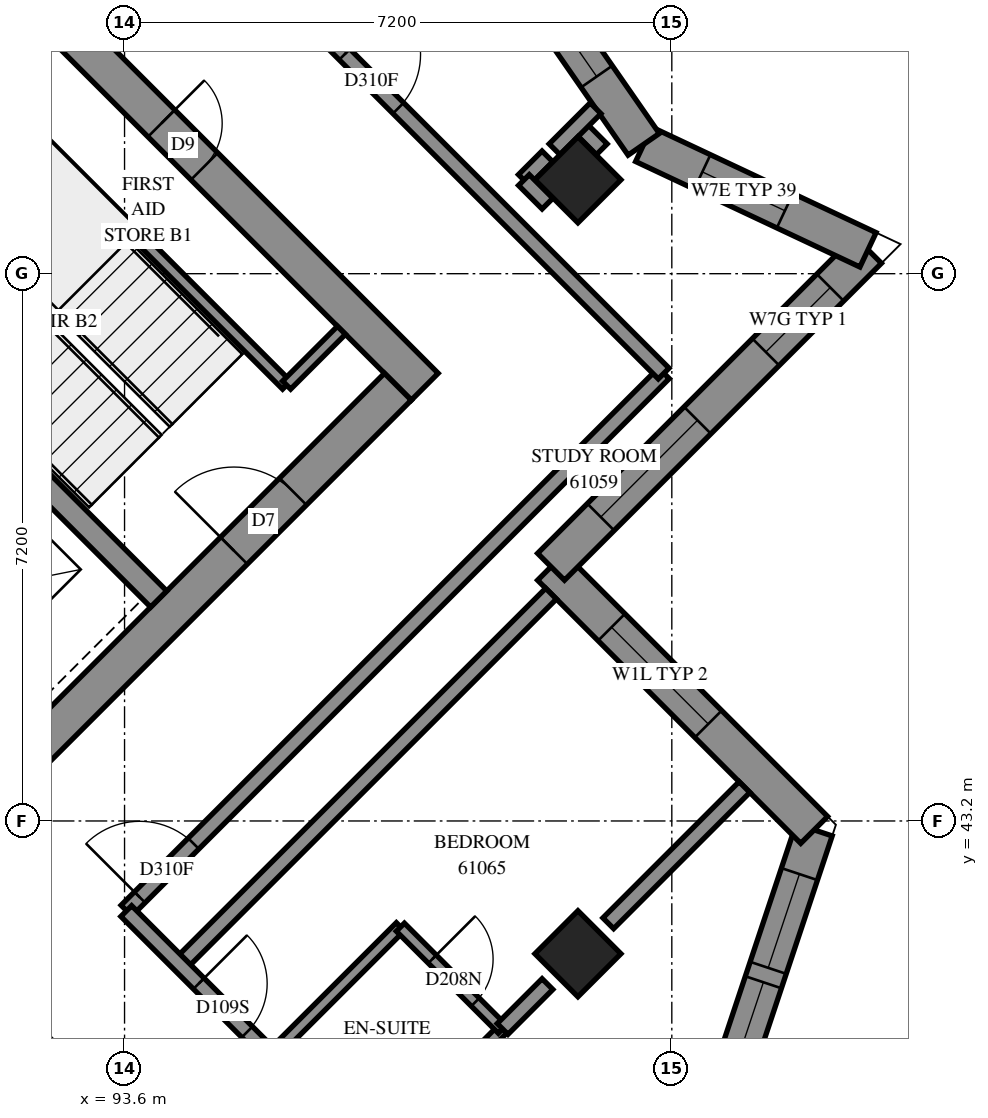
"""IFC4 building model, lengths in metres.
Left out: names, types, materials, properties, quantities, classifications, styles, units other than length and angle.
Written with IfcOpenShell. Run it as: python <this file> out.ifc"""

import sys

from ifc_helpers import new_model, si_unit, direction, frame, frame_2d, origin, origin_2d, place, context, subcontext, project, spatial, polyline, rectangle, outline, extrude, element, fill, save


model = new_model("IFC4")
c1 = context("Model", 3, precision=1e-05, world=origin(), true_north=direction((0.0, 1.0)))
c2 = subcontext(c1, "Body", "Model", "MODEL_VIEW")
j1 = project(units=[si_unit("LENGTHUNIT", "METRE"), si_unit("PLANEANGLEUNIT", "RADIAN")], contexts=[c1])
p1 = place(None, origin())
s1 = spatial("IfcSite", under=j1, at=p1, CompositionType="ELEMENT")
p2 = place(p1, origin())
s2 = spatial("IfcBuilding", under=s1, at=p2, CompositionType="ELEMENT")
p3 = place(p2, frame((0.0, 0.0, 223.6)))
s3 = spatial("IfcBuildingStorey", under=s2, at=p3, CompositionType="ELEMENT", Elevation=223.6)
for number, where, z_axis, x_axis in (
    (1, (99.565, 51.635, 0.0), (0.0, 0.0, 1.0), (0.707, -0.707, 0.0)),
    (2, (99.565, 41.453, 0.0), (0.0, 0.0, 1.0), (0.707, -0.707, 0.0)),
):
    element("IfcColumn", number, at=place(p3, frame(where, z_axis=z_axis, x_axis=x_axis)), inside=s3, PredefinedType="COLUMN", context=c2, shape_type="SweptSolid", body=[
        extrude(rectangle(XDim=0.8, YDim=0.8, at=origin_2d()), origin(), (0.0, 0.0, 1.0), 3.1),
    ])
p4 = place(p3, frame((86.66, 59.802, -0.3), z_axis=(0.0, 0.0, 1.0), x_axis=(0.7071067812, -0.7071067812, 0.0)))
e3 = element("IfcWall", 3, at=p4, inside=s3, PredefinedType="SHEAR", context=c2, shape_type="SweptSolid", body=[
    extrude(rectangle(XDim=15.4, YDim=0.5, at=frame_2d((7.7, 0.0))), origin(), (0.0, 0.0, 1.0), 2.7),
])
p5 = place(p4, frame((10.5, 0.0, 0.3)))
e4 = element("IfcOpeningElement", 4, at=p5, cuts=e3, PredefinedType="OPENING", context=c2, shape_type="SweptSolid", body=[
    extrude(rectangle(XDim=0.8, YDim=2.1, at=frame_2d((0.4, 1.05))), frame((0.0, 0.26, 0.0), z_axis=(0.0, -1.0, 0.0), x_axis=(1.0, 0.0, 0.0)), (0.0, 0.0, 1.0), 0.52),
])
p6 = place(p3, frame((87.013, 38.731, -0.3), z_axis=(0.0, 0.0, 1.0), x_axis=(0.7071067812, 0.7071067812, 0.0)))
e5 = element("IfcWall", 5, at=p6, inside=s3, PredefinedType="SHEAR", context=c2, shape_type="SweptSolid", body=[
    extrude(rectangle(XDim=14.4, YDim=0.5, at=frame_2d((7.2, 0.0))), origin(), (0.0, 0.0, 1.0), 2.7),
])
p7 = place(p6, frame((4.55, 0.0, 0.3)))
e6 = element("IfcOpeningElement", 6, at=p7, cuts=e5, PredefinedType="OPENING", context=c2, shape_type="SweptSolid", body=[
    extrude(rectangle(XDim=1.1, YDim=2.1, at=frame_2d((0.55, 1.05))), frame((0.0, 0.26, 0.0), z_axis=(0.0, -1.0, 0.0), x_axis=(1.0, 0.0, 0.0)), (0.0, 0.0, 1.0), 0.52),
])
p8 = place(p6, frame((11.35, 0.0, 0.3)))
e7 = element("IfcOpeningElement", 7, at=p8, cuts=e5, PredefinedType="OPENING", context=c2, shape_type="SweptSolid", body=[
    extrude(rectangle(XDim=1.1, YDim=2.1, at=frame_2d((0.55, 1.05))), frame((0.0, 0.26, 0.0), z_axis=(0.0, -1.0, 0.0), x_axis=(1.0, 0.0, 0.0)), (0.0, 0.0, 1.0), 0.52),
])
p9 = place(p3, frame((88.958, 51.211, 0.0), z_axis=(0.0, 0.0, 1.0), x_axis=(0.7070998367, -0.7071137256, 0.0)))
e8 = element("IfcWall", 8, at=p9, inside=s3, PredefinedType="SOLIDWALL", context=c2, shape_type="SweptSolid", body=[
    extrude(rectangle(XDim=7.2, YDim=0.3, at=frame_2d((3.6, 0.0))), origin(), (0.0, 0.0, 1.0), 3.1),
])
p10 = place(p3, frame((101.062, 38.252, 0.0), z_axis=(0.0, 0.0, 1.0), x_axis=(0.3162395484, 0.9486793705, 0.0)))
e9 = element("IfcWall", 9, at=p10, inside=s3, PredefinedType="SOLIDWALL", context=c2, shape_type="SweptSolid", body=[
    extrude(outline(polyline([(-0.12, -0.25), (5.247, -0.25), (4.938, 0.25), (0.12, 0.25), (-0.12, -0.25)])), origin(), (0.0, 0.0, 1.0), 3.1),
])
p11 = place(p10, frame((1.68, 0.0, 0.45)))
e10 = element("IfcOpeningElement", 10, at=p11, cuts=e9, PredefinedType="OPENING", context=c2, shape_type="SweptSolid", body=[
    extrude(rectangle(XDim=1.3, YDim=2.5, at=frame_2d((0.65, 1.25))), frame((0.0, 0.26, 0.0), z_axis=(0.0, -1.0, 0.0), x_axis=(1.0, 0.0, 0.0)), (0.0, 0.0, 1.0), 0.52),
])
p12 = place(p10, frame((3.18, 0.0, 0.45)))
e11 = element("IfcOpeningElement", 11, at=p12, cuts=e9, PredefinedType="OPENING", context=c2, shape_type="SweptSolid", body=[
    extrude(rectangle(XDim=1.3, YDim=2.5, at=frame_2d((0.65, 1.25))), frame((0.0, 0.26, 0.0), z_axis=(0.0, -1.0, 0.0), x_axis=(1.0, 0.0, 0.0)), (0.0, 0.0, 1.0), 0.52),
])
p13 = place(p3, frame((102.673, 43.083, 0.0), z_axis=(0.0, 0.0, 1.0), x_axis=(-0.7071067812, 0.7071067812, 0.0)))
e12 = element("IfcWall", 12, at=p13, inside=s3, PredefinedType="SOLIDWALL", context=c2, shape_type="SweptSolid", body=[
    extrude(outline(polyline([(-0.154, -0.25), (4.646, -0.25), (5.146, 0.25), (0.154, 0.25), (-0.154, -0.25)])), origin(), (0.0, 0.0, 1.0), 3.1),
])
p14 = place(p13, frame((1.97, 0.0, 0.6)))
e13 = element("IfcOpeningElement", 13, at=p14, cuts=e12, PredefinedType="OPENING", context=c2, shape_type="SweptSolid", body=[
    extrude(rectangle(XDim=1.8, YDim=1.9, at=frame_2d((0.9, 0.95))), frame((0.0, 0.26, 0.0), z_axis=(0.0, -1.0, 0.0), x_axis=(1.0, 0.0, 0.0)), (0.0, 0.0, 1.0), 0.52),
])
p15 = place(p3, frame((99.211, 46.544, 0.0), z_axis=(0.0, 0.0, 1.0), x_axis=(0.7071152597, 0.7070983025, 0.0)))
e14 = element("IfcWall", 14, at=p15, inside=s3, PredefinedType="SOLIDWALL", context=c2, shape_type="SweptSolid", body=[
    extrude(outline(polyline([(0.25, -0.25), (6.253, -0.25), (5.541, 0.25), (-0.25, 0.25), (0.25, -0.25)])), origin(), (0.0, 0.0, 1.0), 3.1),
])
p16 = place(p15, frame((0.925, 0.0, 0.6)))
e15 = element("IfcOpeningElement", 15, at=p16, cuts=e14, PredefinedType="OPENING", context=c2, shape_type="SweptSolid", body=[
    extrude(rectangle(XDim=1.8, YDim=1.9, at=frame_2d((0.9, 0.95))), frame((0.0, 0.26, 0.0), z_axis=(0.0, -1.0, 0.0), x_axis=(1.0, 0.0, 0.0)), (0.0, 0.0, 1.0), 0.52),
])
p17 = place(p15, frame((3.996, 0.0, 0.6)))
e16 = element("IfcOpeningElement", 16, at=p17, cuts=e14, PredefinedType="OPENING", context=c2, shape_type="SweptSolid", body=[
    extrude(rectangle(XDim=1.2, YDim=1.9, at=frame_2d((0.6, 0.95))), frame((0.0, 0.26, 0.0), z_axis=(0.0, -1.0, 0.0), x_axis=(1.0, 0.0, 0.0)), (0.0, 0.0, 1.0), 0.52),
])
p18 = place(p3, frame((103.381, 50.714, 0.0), z_axis=(0.0, 0.0, 1.0), x_axis=(-0.9049027781, 0.4256183292, 0.0)))
e17 = element("IfcWall", 17, at=p18, inside=s3, PredefinedType="SOLIDWALL", context=c2, shape_type="SweptSolid", body=[
    extrude(outline(polyline([(-0.356, -0.25), (3.194, -0.25), (3.328, 0.25), (0.356, 0.25), (-0.356, -0.25)])), origin(), (0.0, 0.0, 1.0), 3.1),
])
p19 = place(p18, frame((1.208, 0.0, 0.45)))
e18 = element("IfcOpeningElement", 18, at=p19, cuts=e17, PredefinedType="OPENING", context=c2, shape_type="SweptSolid", body=[
    extrude(rectangle(XDim=1.2, YDim=2.5, at=frame_2d((0.6, 1.25))), frame((0.0, 0.26, 0.0), z_axis=(0.0, -1.0, 0.0), x_axis=(1.0, 0.0, 0.0)), (0.0, 0.0, 1.0), 0.52),
])
p20 = place(p3, frame((100.43, 52.102, 0.0), z_axis=(0.0, 0.0, 1.0), x_axis=(-0.5702097962, 0.8214991103, 0.0)))
e19 = element("IfcWall", 19, at=p20, inside=s3, PredefinedType="SOLIDWALL", context=c2, shape_type="SweptSolid", body=[
    extrude(outline(polyline([(0.067, -0.25), (3.461, -0.25), (3.37, 0.25), (-0.067, 0.25), (0.067, -0.25)])), origin(), (0.0, 0.0, 1.0), 3.1),
])
p21 = place(p20, frame((1.085, 0.0, 0.45)))
e20 = element("IfcOpeningElement", 20, at=p21, cuts=e19, PredefinedType="OPENING", context=c2, shape_type="SweptSolid", body=[
    extrude(rectangle(XDim=1.2, YDim=2.5, at=frame_2d((0.6, 1.25))), frame((0.0, 0.26, 0.0), z_axis=(0.0, -1.0, 0.0), x_axis=(1.0, 0.0, 0.0)), (0.0, 0.0, 1.0), 0.52),
])
p22 = place(p3, frame((91.313, 53.354, 0.0), z_axis=(0.0, 0.0, 1.0), x_axis=(0.7071147811, -0.7070987812, 0.0)))
e21 = element("IfcWall", 21, at=p22, inside=s3, PredefinedType="PARTITIONING", context=c2, shape_type="SweptSolid", body=[
    extrude(rectangle(XDim=6.25, YDim=0.15, at=frame_2d((3.125, 0.0))), origin(), (0.0, 0.0, 1.0), 3.1),
])
p23 = place(p3, frame((95.732, 48.934, 0.0), z_axis=(0.0, 0.0, 1.0), x_axis=(0.7071067812, 0.7071067812, 0.0)))
e22 = element("IfcWall", 22, at=p23, inside=s3, PredefinedType="PARTITIONING", context=c2, shape_type="SweptSolid", body=[
    extrude(rectangle(XDim=1.02, YDim=0.15, at=frame_2d((0.51, 0.0))), origin(), (0.0, 0.0, 1.0), 3.1),
])
p24 = place(p3, frame((93.625, 42.021, 0.0), z_axis=(0.0, 0.0, 1.0), x_axis=(0.7071067812, 0.7071067812, 0.0)))
e23 = element("IfcWall", 23, at=p24, inside=s3, PredefinedType="PARTITIONING", context=c2, shape_type="SweptSolid", body=[
    extrude(rectangle(XDim=9.998, YDim=0.2, at=frame_2d((4.999, 0.0))), origin(), (0.0, 0.0, 1.0), 3.1),
])
p25 = place(p24, frame((0.248, 0.0, 0.0)))
e24 = element("IfcOpeningElement", 24, at=p25, cuts=e23, PredefinedType="OPENING", context=c2, shape_type="SweptSolid", body=[
    extrude(rectangle(XDim=1.0, YDim=2.1, at=frame_2d((0.5, 1.05))), frame((0.0, 0.11, 0.0), z_axis=(0.0, -1.0, 0.0), x_axis=(1.0, 0.0, 0.0)), (0.0, 0.0, 1.0), 0.22),
])
p26 = place(p3, frame((94.331, 41.313, 0.0), z_axis=(0.0, 0.0, 1.0), x_axis=(0.7072516979, 0.7069618347, 0.0)))
e25 = element("IfcWall", 25, at=p26, inside=s3, PredefinedType="PARTITIONING", context=c2, shape_type="SweptSolid", body=[
    extrude(rectangle(XDim=6.9, YDim=0.2, at=frame_2d((3.45, 0.0))), origin(), (0.0, 0.0, 1.0), 3.1),
])
p27 = place(p3, frame((96.309, 53.471, 0.0), z_axis=(0.0, 0.0, 1.0), x_axis=(0.7071067812, -0.7071067812, 0.0)))
e26 = element("IfcWall", 26, at=p27, inside=s3, PredefinedType="PARTITIONING", context=c2, shape_type="SweptSolid", body=[
    extrude(rectangle(XDim=6.2, YDim=0.2, at=frame_2d((3.1, 0.0))), origin(), (0.0, 0.0, 1.0), 3.1),
])
p28 = place(p27, frame((0.263, 0.0, 0.0)))
e27 = element("IfcOpeningElement", 27, at=p28, cuts=e26, PredefinedType="OPENING", context=c2, shape_type="SweptSolid", body=[
    extrude(rectangle(XDim=1.0, YDim=2.1, at=frame_2d((0.5, 1.05))), frame((0.0, 0.11, 0.0), z_axis=(0.0, -1.0, 0.0), x_axis=(1.0, 0.0, 0.0)), (0.0, 0.0, 1.0), 0.22),
])
p29 = place(p3, frame((93.623, 42.015, 0.0), z_axis=(0.0, 0.0, 1.0), x_axis=(0.7071067812, -0.7071067812, 0.0)))
e28 = element("IfcWall", 28, at=p29, inside=s3, PredefinedType="PARTITIONING", context=c2, shape_type="SweptSolid", body=[
    extrude(rectangle(XDim=4.599, YDim=0.2, at=frame_2d((2.3, 0.0))), origin(), (0.0, 0.0, 1.0), 3.1),
])
p30 = place(p29, frame((1.349, 0.0, 0.0)))
e29 = element("IfcOpeningElement", 29, at=p30, cuts=e28, PredefinedType="OPENING", context=c2, shape_type="SweptSolid", body=[
    extrude(rectangle(XDim=0.9, YDim=2.1, at=frame_2d((0.45, 1.05))), frame((0.0, 0.11, 0.0), z_axis=(0.0, -1.0, 0.0), x_axis=(1.0, 0.0, 0.0)), (0.0, 0.0, 1.0), 0.22),
])
p31 = place(p3, frame((92.216, 40.608, 0.0), z_axis=(0.0, 0.0, 1.0), x_axis=(0.7071067812, -0.7071067812, 0.0)))
e30 = element("IfcWall", 30, at=p31, inside=s3, PredefinedType="PARTITIONING", context=c2, shape_type="SweptSolid", body=[
    extrude(rectangle(XDim=4.599, YDim=0.2, at=frame_2d((2.3, 0.0))), origin(), (0.0, 0.0, 1.0), 3.1),
])
p32 = place(p31, frame((3.189, 0.0, 0.0)))
e31 = element("IfcOpeningElement", 31, at=p32, cuts=e30, PredefinedType="OPENING", context=c2, shape_type="SweptSolid", body=[
    extrude(rectangle(XDim=0.9, YDim=2.1, at=frame_2d((0.45, 1.05))), frame((0.0, 0.11, 0.0), z_axis=(0.0, -1.0, 0.0), x_axis=(1.0, 0.0, 0.0)), (0.0, 0.0, 1.0), 0.22),
])
p33 = place(p3, frame((99.964, 41.854, 0.0), z_axis=(0.0, 0.0, 1.0), x_axis=(0.7071265121, 0.7070870497, 0.0)))
e32 = element("IfcWall", 32, at=p33, inside=s3, PredefinedType="PARTITIONING", context=c2, shape_type="SweptSolid", body=[
    extrude(rectangle(XDim=2.534, YDim=0.2, at=frame_2d((1.267, 0.0))), origin(), (0.0, 0.0, 1.0), 3.1),
])
p34 = place(p3, frame((96.879, 38.764, 0.0), z_axis=(0.0, 0.0, 1.0), x_axis=(0.706689978, 0.7075233388, 0.0)))
e33 = element("IfcWall", 33, at=p34, inside=s3, PredefinedType="PARTITIONING", context=c2, shape_type="SweptSolid", body=[
    extrude(rectangle(XDim=2.4, YDim=0.15, at=frame_2d((1.2, 0.0))), origin(), (0.0, 0.0, 1.0), 2.6),
])
p35 = place(p3, frame((95.531, 40.113, 0.0), z_axis=(0.0, 0.0, 1.0), x_axis=(0.7075233388, 0.706689978, 0.0)))
e34 = element("IfcWall", 34, at=p35, inside=s3, PredefinedType="PARTITIONING", context=c2, shape_type="SweptSolid", body=[
    extrude(rectangle(XDim=2.4, YDim=0.15, at=frame_2d((1.2, 0.0))), origin(), (0.0, 0.0, 1.0), 3.1),
])
p36 = place(p3, frame((97.229, 41.803, 0.0), z_axis=(0.0, 0.0, 1.0), x_axis=(0.7071067812, -0.7071067812, 0.0)))
e35 = element("IfcWall", 35, at=p36, inside=s3, PredefinedType="PARTITIONING", context=c2, shape_type="SweptSolid", body=[
    extrude(rectangle(XDim=1.898, YDim=0.15, at=frame_2d((0.949, 0.0))), origin(), (0.0, 0.0, 1.0), 3.1),
])
p37 = place(p36, frame((0.594, 0.0, 0.0)))
e36 = element("IfcOpeningElement", 36, at=p37, cuts=e35, PredefinedType="OPENING", context=c2, shape_type="SweptSolid", body=[
    extrude(rectangle(XDim=0.8, YDim=2.1, at=frame_2d((0.4, 1.05))), frame((0.0, 0.085, 0.0), z_axis=(0.0, -1.0, 0.0), x_axis=(1.0, 0.0, 0.0)), (0.0, 0.0, 1.0), 0.17),
])
p38 = place(p3, frame((98.574, 40.464, 0.0), z_axis=(0.0, 0.0, 1.0), x_axis=(0.7071067812, 0.7071067812, 0.0)))
e37 = element("IfcWall", 37, at=p38, inside=s3, PredefinedType="PARTITIONING", context=c2, shape_type="SweptSolid", body=[
    extrude(rectangle(XDim=0.834, YDim=0.2, at=frame_2d((0.417, 0.0))), origin(), (0.0, 0.0, 1.0), 2.6),
])
for number, where, z_axis, x_axis in (
    (38, (98.853, 51.633, 0.0), (0.0, 0.0, 1.0), (0.707, 0.707, 0.0)),
    (39, (98.854, 51.632, 0.0), (0.0, 0.0, 1.0), (0.707, -0.707, 0.0)),
    (40, (99.568, 52.346, 0.0), (0.0, 0.0, 1.0), (0.707, -0.707, 0.0)),
):
    element("IfcWall", number, at=place(p3, frame(where, z_axis=z_axis, x_axis=x_axis)), inside=s3, PredefinedType="PARTITIONING", context=c2, shape_type="SweptSolid", body=[
        extrude(rectangle(XDim=0.438, YDim=0.2, at=frame_2d((0.219, 0.0))), origin(), (0.0, 0.0, 1.0), 3.1),
    ])
p39 = place(p3, frame((99.257, 52.037, 0.0), z_axis=(0.0, 0.0, 1.0), x_axis=(0.7071067812, 0.7071067812, 0.0)))
e41 = element("IfcWall", 41, at=p39, inside=s3, PredefinedType="PARTITIONING", context=c2, shape_type="SweptSolid", body=[
    extrude(rectangle(XDim=0.763, YDim=0.2, at=frame_2d((0.382, 0.0))), origin(), (0.0, 0.0, 1.0), 3.1),
])
p40 = place(p11, origin())
e42 = element("IfcWindow", 42, at=p40, inside=s3, PartitioningType="SINGLE_PANEL", PredefinedType="WINDOW", context=c2, shape_type="SweptSolid", body=[
    extrude(rectangle(XDim=1.3, YDim=2.5, at=frame_2d((0.65, 1.25))), frame((0.0, 0.18, 0.0), z_axis=(0.0, -1.0, 0.0), x_axis=(1.0, 0.0, 0.0)), (0.0, 0.0, 1.0), 0.06),
])
fill(e10, e42)
p41 = place(p12, origin())
e43 = element("IfcWindow", 43, at=p41, inside=s3, PartitioningType="SINGLE_PANEL", PredefinedType="WINDOW", context=c2, shape_type="SweptSolid", body=[
    extrude(rectangle(XDim=1.3, YDim=2.5, at=frame_2d((0.65, 1.25))), frame((0.0, 0.18, 0.0), z_axis=(0.0, -1.0, 0.0), x_axis=(1.0, 0.0, 0.0)), (0.0, 0.0, 1.0), 0.06),
])
fill(e11, e43)
p42 = place(p14, origin())
e44 = element("IfcWindow", 44, at=p42, inside=s3, PartitioningType="SINGLE_PANEL", PredefinedType="WINDOW", context=c2, shape_type="SweptSolid", body=[
    extrude(rectangle(XDim=1.8, YDim=1.9, at=frame_2d((0.9, 0.95))), frame((0.0, 0.18, 0.0), z_axis=(0.0, -1.0, 0.0), x_axis=(1.0, 0.0, 0.0)), (0.0, 0.0, 1.0), 0.06),
])
fill(e13, e44)
p43 = place(p16, origin())
e45 = element("IfcWindow", 45, at=p43, inside=s3, PartitioningType="SINGLE_PANEL", PredefinedType="WINDOW", context=c2, shape_type="SweptSolid", body=[
    extrude(rectangle(XDim=1.8, YDim=1.9, at=frame_2d((0.9, 0.95))), frame((0.0, 0.18, 0.0), z_axis=(0.0, -1.0, 0.0), x_axis=(1.0, 0.0, 0.0)), (0.0, 0.0, 1.0), 0.06),
])
fill(e15, e45)
p44 = place(p17, origin())
e46 = element("IfcWindow", 46, at=p44, inside=s3, PartitioningType="SINGLE_PANEL", PredefinedType="WINDOW", context=c2, shape_type="SweptSolid", body=[
    extrude(rectangle(XDim=1.2, YDim=1.9, at=frame_2d((0.6, 0.95))), frame((0.0, 0.18, 0.0), z_axis=(0.0, -1.0, 0.0), x_axis=(1.0, 0.0, 0.0)), (0.0, 0.0, 1.0), 0.06),
])
fill(e16, e46)
p45 = place(p19, origin())
e47 = element("IfcWindow", 47, at=p45, inside=s3, PartitioningType="SINGLE_PANEL", PredefinedType="WINDOW", context=c2, shape_type="SweptSolid", body=[
    extrude(rectangle(XDim=1.2, YDim=2.5, at=frame_2d((0.6, 1.25))), frame((0.0, 0.18, 0.0), z_axis=(0.0, -1.0, 0.0), x_axis=(1.0, 0.0, 0.0)), (0.0, 0.0, 1.0), 0.06),
])
fill(e18, e47)
p46 = place(p21, origin())
e48 = element("IfcWindow", 48, at=p46, inside=s3, PartitioningType="SINGLE_PANEL", PredefinedType="WINDOW", context=c2, shape_type="SweptSolid", body=[
    extrude(rectangle(XDim=1.2, YDim=2.5, at=frame_2d((0.6, 1.25))), frame((0.0, 0.18, 0.0), z_axis=(0.0, -1.0, 0.0), x_axis=(1.0, 0.0, 0.0)), (0.0, 0.0, 1.0), 0.06),
])
fill(e20, e48)
p47 = place(p5, origin())
e49 = element("IfcDoor", 49, at=p47, inside=s3, OperationType="SINGLE_SWING_RIGHT", PredefinedType="DOOR", context=c2, shape_type="SweptSolid", body=[
    extrude(rectangle(XDim=0.8, YDim=2.1, at=frame_2d((0.4, 1.05))), frame((0.0, 0.025, 0.0), z_axis=(0.0, -1.0, 0.0), x_axis=(1.0, 0.0, 0.0)), (0.0, 0.0, 1.0), 0.05),
])
fill(e4, e49)
p48 = place(p8, origin())
e50 = element("IfcDoor", 50, at=p48, inside=s3, OperationType="SINGLE_SWING_RIGHT", PredefinedType="DOOR", context=c2, shape_type="SweptSolid", body=[
    extrude(rectangle(XDim=1.1, YDim=2.1, at=frame_2d((0.55, 1.05))), frame((0.0, 0.025, 0.0), z_axis=(0.0, -1.0, 0.0), x_axis=(1.0, 0.0, 0.0)), (0.0, 0.0, 1.0), 0.05),
])
fill(e7, e50)
p49 = place(p25, origin())
e51 = element("IfcDoor", 51, at=p49, inside=s3, OperationType="SINGLE_SWING_LEFT", PredefinedType="DOOR", context=c2, shape_type="SweptSolid", body=[
    extrude(rectangle(XDim=1.0, YDim=2.1, at=frame_2d((0.5, 1.05))), frame((0.0, 0.025, 0.0), z_axis=(0.0, -1.0, 0.0), x_axis=(1.0, 0.0, 0.0)), (0.0, 0.0, 1.0), 0.05),
])
fill(e24, e51)
p50 = place(p28, origin())
e52 = element("IfcDoor", 52, at=p50, inside=s3, OperationType="SINGLE_SWING_LEFT", PredefinedType="DOOR", context=c2, shape_type="SweptSolid", body=[
    extrude(rectangle(XDim=1.0, YDim=2.1, at=frame_2d((0.5, 1.05))), frame((0.0, 0.025, 0.0), z_axis=(0.0, -1.0, 0.0), x_axis=(1.0, 0.0, 0.0)), (0.0, 0.0, 1.0), 0.05),
])
fill(e27, e52)
p51 = place(p30, origin())
e53 = element("IfcDoor", 53, at=p51, inside=s3, OperationType="SINGLE_SWING_RIGHT", PredefinedType="DOOR", context=c2, shape_type="SweptSolid", body=[
    extrude(rectangle(XDim=0.9, YDim=2.1, at=frame_2d((0.45, 1.05))), frame((0.0, 0.025, 0.0), z_axis=(0.0, -1.0, 0.0), x_axis=(1.0, 0.0, 0.0)), (0.0, 0.0, 1.0), 0.05),
])
fill(e29, e53)
p52 = place(p37, origin())
e54 = element("IfcDoor", 54, at=p52, inside=s3, OperationType="SINGLE_SWING_RIGHT", PredefinedType="DOOR", context=c2, shape_type="SweptSolid", body=[
    extrude(rectangle(XDim=0.8, YDim=2.1, at=frame_2d((0.4, 1.05))), frame((0.0, 0.025, 0.0), z_axis=(0.0, -1.0, 0.0), x_axis=(1.0, 0.0, 0.0)), (0.0, 0.0, 1.0), 0.05),
])
fill(e36, e54)
save(model, sys.argv[1])
